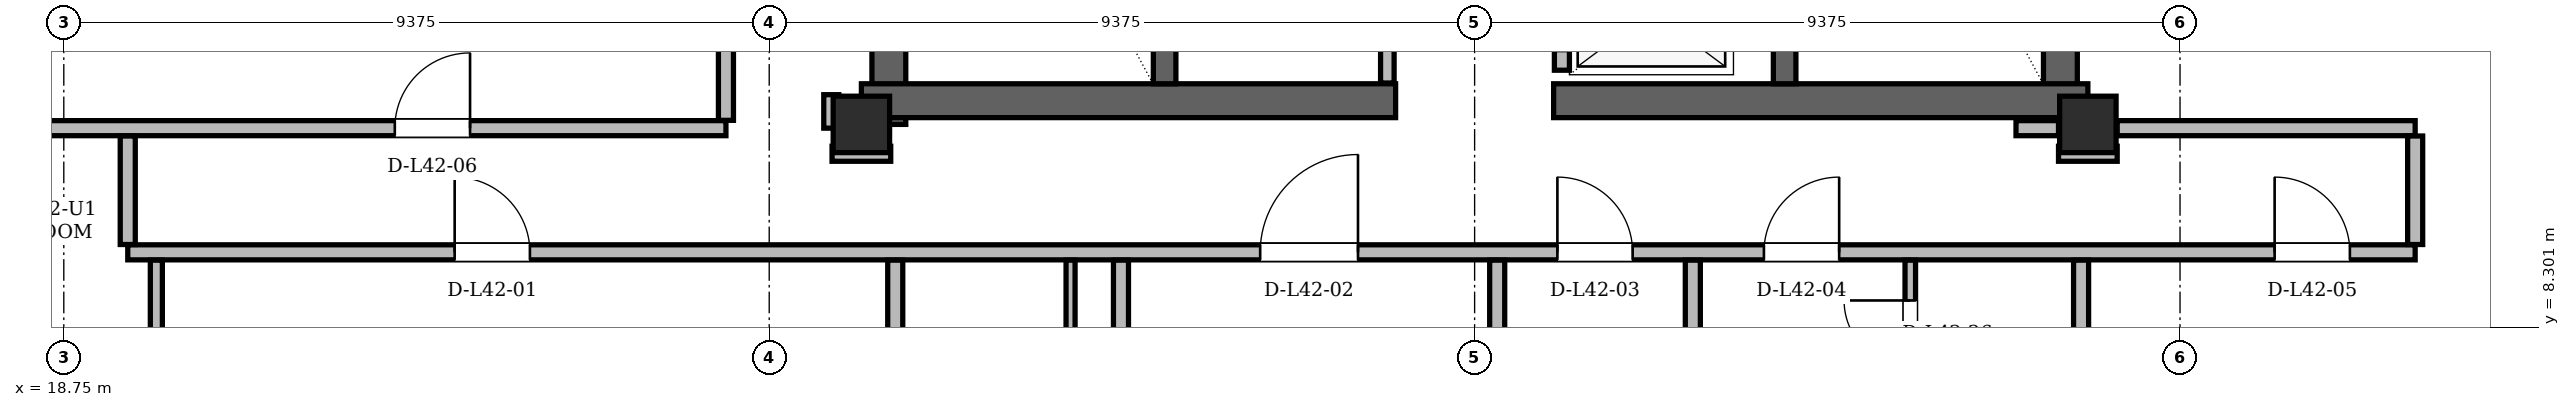
"""IFC4 building model, lengths in metres.
Left out: names, types, materials, properties, quantities, classifications, styles, units other than length and angle.
Written with IfcOpenShell. Run it as: python <this file> out.ifc"""

import sys

from ifc_helpers import new_model, si_unit, direction, frame, frame_2d, origin, origin_2d, place, context, subcontext, project, spatial, rectangle, hollow_rectangle, extrude, element, fill, save


model = new_model("IFC4")
c1 = context("Model", 3, precision=1e-05, world=origin(), true_north=direction((0.0, 1.0)))
c2 = subcontext(c1, "Body", "Model", "MODEL_VIEW")
j1 = project(units=[si_unit("LENGTHUNIT", "METRE"), si_unit("PLANEANGLEUNIT", "RADIAN")], contexts=[c1])
p1 = place(None, origin())
s1 = spatial("IfcSite", under=j1, at=p1, CompositionType="ELEMENT")
p2 = place(p1, origin())
s2 = spatial("IfcBuilding", under=s1, at=p2, CompositionType="ELEMENT")
p3 = place(p2, frame((0.0, 0.0, 160.2)))
s3 = spatial("IfcBuildingStorey", under=s2, at=p3, CompositionType="ELEMENT", Elevation=160.2)
for number, where, z_axis, x_axis in (
    (1, (29.35, 11.0, 0.0), (0.0, 0.0, 1.0), (1.0, 0.0, 0.0)),
    (2, (45.65, 11.0, 0.0), (0.0, 0.0, 1.0), (1.0, 0.0, 0.0)),
):
    element("IfcColumn", number, at=place(p3, frame(where, z_axis=z_axis, x_axis=x_axis)), inside=s3, PredefinedType="COLUMN", context=c2, shape_type="SweptSolid", body=[
        extrude(hollow_rectangle(XDim=0.75, YDim=0.75, WallThickness=0.06, at=origin_2d()), origin(), (0.0, 0.0, 1.0), 3.6),
    ])
for number, where, z_axis, x_axis in (
    (3, (29.715, 11.0, 0.0), (0.0, 0.0, 1.0), (0.0, 1.0, 0.0)),
    (4, (45.285, 11.0, 0.0), (0.0, 0.0, 1.0), (0.0, 1.0, 0.0)),
):
    element("IfcWall", number, at=place(p3, frame(where, z_axis=z_axis, x_axis=x_axis)), inside=s3, PredefinedType="SHEAR", context=c2, shape_type="SweptSolid", body=[
        extrude(rectangle(XDim=13.3, YDim=0.45, at=frame_2d((6.65, 0.0))), origin(), (0.0, 0.0, 1.0), 3.38),
    ])
for number, where, z_axis, x_axis in (
    (5, (29.35, 11.315, 0.0), (0.0, 0.0, 1.0), (1.0, 0.0, 0.0)),
    (6, (38.55, 11.315, 0.0), (0.0, 0.0, 1.0), (1.0, 0.0, 0.0)),
):
    element("IfcWall", number, at=place(p3, frame(where, z_axis=z_axis, x_axis=x_axis)), inside=s3, PredefinedType="SHEAR", context=c2, shape_type="SweptSolid", body=[
        extrude(rectangle(XDim=7.1, YDim=0.45, at=frame_2d((3.55, 0.0))), origin(), (0.0, 0.0, 1.0), 3.38),
    ])
for number, where, z_axis, x_axis in (
    (7, (33.38, 11.54, 0.0), (0.0, 0.0, 1.0), (0.0, 1.0, 0.0)),
    (8, (41.62, 11.54, 0.0), (0.0, 0.0, 1.0), (0.0, 1.0, 0.0)),
):
    element("IfcWall", number, at=place(p3, frame(where, z_axis=z_axis, x_axis=x_axis)), inside=s3, PredefinedType="SHEAR", context=c2, shape_type="SweptSolid", body=[
        extrude(rectangle(XDim=7.62, YDim=0.3, at=frame_2d((3.81, 0.0))), origin(), (0.0, 0.0, 1.0), 3.38),
    ])
p4 = place(p3, frame((15.147, 12.41, 0.0), z_axis=(0.0, 0.0, 1.0), x_axis=(0.500007864018, -0.866020863444, 0.0)))
e9 = element("IfcWall", 9, at=p4, inside=s3, PredefinedType="SOLIDWALL", context=c2, shape_type="SweptSolid", body=[
    extrude(rectangle(XDim=9.033, YDim=0.34, at=frame_2d((4.517, 0.0))), origin(), (0.0, 0.0, 1.0), 2.6),
])
p5 = place(p3, frame((36.34, 11.55, 0.0), z_axis=(0.0, 0.0, 1.0), x_axis=(0.0, 1.0, 0.0)))
e10 = element("IfcWall", 10, at=p5, inside=s3, PredefinedType="PARTITIONING", context=c2, shape_type="SweptSolid", body=[
    extrude(rectangle(XDim=5.55, YDim=0.18, at=frame_2d((2.775, 0.0))), origin(), (0.0, 0.0, 1.0), 3.38),
])
p6 = place(p5, frame((2.85, 0.0, 0.0)))
e11 = element("IfcOpeningElement", 11, at=p6, cuts=e10, PredefinedType="OPENING", context=c2, shape_type="SweptSolid", body=[
    extrude(rectangle(XDim=0.95, YDim=2.1, at=frame_2d((0.475, 1.05))), frame((0.0, 0.09, 0.0), z_axis=(0.0, -1.0, 0.0), x_axis=(1.0, 0.0, 0.0)), (0.0, 0.0, 1.0), 0.18),
])
p7 = place(p3, frame((38.66, 11.72, 0.0), z_axis=(0.0, 0.0, 1.0), x_axis=(0.0, 1.0, 0.0)))
e12 = element("IfcWall", 12, at=p7, inside=s3, PredefinedType="PARTITIONING", context=c2, shape_type="SweptSolid", body=[
    extrude(rectangle(XDim=9.1, YDim=0.2, at=frame_2d((4.55, 0.0))), origin(), (0.0, 0.0, 1.0), 3.38),
])
p8 = place(p7, frame((0.255, 0.0, 0.0)))
e13 = element("IfcOpeningElement", 13, at=p8, cuts=e12, PredefinedType="OPENING", context=c2, shape_type="SweptSolid", body=[
    extrude(rectangle(XDim=1.05, YDim=2.15, at=frame_2d((0.525, 1.075))), frame((0.0, 0.1, 0.0), z_axis=(0.0, -1.0, 0.0), x_axis=(1.0, 0.0, 0.0)), (0.0, 0.0, 1.0), 0.2),
])
p9 = place(p7, frame((2.105, 0.0, 0.0)))
e14 = element("IfcOpeningElement", 14, at=p9, cuts=e12, PredefinedType="OPENING", context=c2, shape_type="SweptSolid", body=[
    extrude(rectangle(XDim=1.05, YDim=2.15, at=frame_2d((0.525, 1.075))), frame((0.0, 0.1, 0.0), z_axis=(0.0, -1.0, 0.0), x_axis=(1.0, 0.0, 0.0)), (0.0, 0.0, 1.0), 0.2),
])
p10 = place(p7, frame((3.955, 0.0, 0.0)))
e15 = element("IfcOpeningElement", 15, at=p10, cuts=e12, PredefinedType="OPENING", context=c2, shape_type="SweptSolid", body=[
    extrude(rectangle(XDim=1.05, YDim=2.15, at=frame_2d((0.525, 1.075))), frame((0.0, 0.1, 0.0), z_axis=(0.0, -1.0, 0.0), x_axis=(1.0, 0.0, 0.0)), (0.0, 0.0, 1.0), 0.2),
])
p11 = place(p3, frame((19.6, 9.3, 0.0), z_axis=(0.0, 0.0, 1.0), x_axis=(1.0, 0.0, 0.0)))
e16 = element("IfcWall", 16, at=p11, inside=s3, PredefinedType="PARTITIONING", context=c2, shape_type="SweptSolid", body=[
    extrude(rectangle(XDim=30.4, YDim=0.2, at=frame_2d((15.2, 0.0))), origin(), (0.0, 0.0, 1.0), 2.842),
])
p12 = place(p11, frame((4.345, 0.0, 0.0)))
e17 = element("IfcOpeningElement", 17, at=p12, cuts=e16, PredefinedType="OPENING", context=c2, shape_type="SweptSolid", body=[
    extrude(rectangle(XDim=1.0, YDim=2.18, at=frame_2d((0.5, 1.09))), frame((0.0, 0.1, 0.0), z_axis=(0.0, -1.0, 0.0), x_axis=(1.0, 0.0, 0.0)), (0.0, 0.0, 1.0), 0.2),
])
p13 = place(p11, frame((15.05, 0.0, 0.0)))
e18 = element("IfcOpeningElement", 18, at=p13, cuts=e16, PredefinedType="OPENING", context=c2, shape_type="SweptSolid", body=[
    extrude(rectangle(XDim=1.3, YDim=2.2, at=frame_2d((0.65, 1.1))), frame((0.0, 0.1, 0.0), z_axis=(0.0, -1.0, 0.0), x_axis=(1.0, 0.0, 0.0)), (0.0, 0.0, 1.0), 0.2),
])
p14 = place(p11, frame((19.0, 0.0, 0.0)))
e19 = element("IfcOpeningElement", 19, at=p14, cuts=e16, PredefinedType="OPENING", context=c2, shape_type="SweptSolid", body=[
    extrude(rectangle(XDim=1.0, YDim=2.18, at=frame_2d((0.5, 1.09))), frame((0.0, 0.1, 0.0), z_axis=(0.0, -1.0, 0.0), x_axis=(1.0, 0.0, 0.0)), (0.0, 0.0, 1.0), 0.2),
])
p15 = place(p11, frame((21.745, 0.0, 0.0)))
e20 = element("IfcOpeningElement", 20, at=p15, cuts=e16, PredefinedType="OPENING", context=c2, shape_type="SweptSolid", body=[
    extrude(rectangle(XDim=1.0, YDim=2.18, at=frame_2d((0.5, 1.09))), frame((0.0, 0.1, 0.0), z_axis=(0.0, -1.0, 0.0), x_axis=(1.0, 0.0, 0.0)), (0.0, 0.0, 1.0), 0.2),
])
p16 = place(p11, frame((28.532, 0.0, 0.0)))
e21 = element("IfcOpeningElement", 21, at=p16, cuts=e16, PredefinedType="OPENING", context=c2, shape_type="SweptSolid", body=[
    extrude(rectangle(XDim=1.0, YDim=2.18, at=frame_2d((0.5, 1.09))), frame((0.0, 0.1, 0.0), z_axis=(0.0, -1.0, 0.0), x_axis=(1.0, 0.0, 0.0)), (0.0, 0.0, 1.0), 0.2),
])
for number, where, z_axis, x_axis in (
    (22, (28.96, 10.61, 0.0), (0.0, 0.0, 1.0), (1.0, 0.0, 0.0)),
    (23, (45.26, 10.61, 0.0), (0.0, 0.0, 1.0), (1.0, 0.0, 0.0)),
):
    element("IfcWall", number, at=place(p3, frame(where, z_axis=z_axis, x_axis=x_axis)), inside=s3, PredefinedType="PARTITIONING", context=c2, shape_type="SweptSolid", body=[
        extrude(rectangle(XDim=0.78, YDim=0.2, at=frame_2d((0.39, 0.0))), origin(), (0.0, 0.0, 1.0), 2.42),
    ])
p17 = place(p3, frame((16.191, 10.95, 0.0), z_axis=(0.0, 0.0, 1.0), x_axis=(1.0, 0.0, 0.0)))
e24 = element("IfcWall", 24, at=p17, inside=s3, PredefinedType="PARTITIONING", context=c2, shape_type="SweptSolid", body=[
    extrude(rectangle(XDim=11.359, YDim=0.2, at=frame_2d((5.68, 0.0))), origin(), (0.0, 0.0, 1.0), 3.38),
])
p18 = place(p17, frame((6.958, 0.0, 0.0)))
e25 = element("IfcOpeningElement", 25, at=p18, cuts=e24, PredefinedType="OPENING", context=c2, shape_type="SweptSolid", body=[
    extrude(rectangle(XDim=1.0, YDim=2.18, at=frame_2d((0.5, 1.09))), frame((0.0, 0.1, 0.0), z_axis=(0.0, -1.0, 0.0), x_axis=(1.0, 0.0, 0.0)), (0.0, 0.0, 1.0), 0.2),
])
p19 = place(p3, frame((44.695, 10.95, 0.0), z_axis=(0.0, 0.0, 1.0), x_axis=(1.0, 0.0, 0.0)))
e26 = element("IfcWall", 26, at=p19, inside=s3, PredefinedType="PARTITIONING", context=c2, shape_type="SweptSolid", body=[
    extrude(rectangle(XDim=0.565, YDim=0.2, at=frame_2d((0.282, 0.0))), origin(), (0.0, 0.0, 1.0), 2.42),
])
p20 = place(p3, frame((46.04, 10.95, 0.0), z_axis=(0.0, 0.0, 1.0), x_axis=(1.0, 0.0, 0.0)))
e27 = element("IfcWall", 27, at=p20, inside=s3, PredefinedType="PARTITIONING", context=c2, shape_type="SweptSolid", body=[
    extrude(rectangle(XDim=3.96, YDim=0.2, at=frame_2d((1.98, 0.0))), origin(), (0.0, 0.0, 1.0), 2.842),
])
p21 = place(p3, frame((19.6, 9.404, 0.0), z_axis=(0.0, 0.0, 1.0), x_axis=(0.0, 1.0, 0.0)))
e28 = element("IfcWall", 28, at=p21, inside=s3, PredefinedType="PARTITIONING", context=c2, shape_type="SweptSolid", body=[
    extrude(rectangle(XDim=1.442, YDim=0.2, at=frame_2d((0.721, 0.0))), origin(), (0.0, 0.0, 1.0), 3.38),
])
p22 = place(p3, frame((19.98, 4.989, 0.0), z_axis=(0.0, 0.0, 1.0), x_axis=(0.0, 1.0, 0.0)))
e29 = element("IfcWall", 29, at=p22, inside=s3, PredefinedType="PARTITIONING", context=c2, shape_type="SweptSolid", body=[
    extrude(rectangle(XDim=4.207, YDim=0.16, at=frame_2d((2.104, 0.0))), origin(), (0.0, 0.0, 1.0), 3.38),
])
p23 = place(p22, frame((1.589, 0.0, 0.0)))
e30 = element("IfcOpeningElement", 30, at=p23, cuts=e29, PredefinedType="OPENING", context=c2, shape_type="SweptSolid", body=[
    extrude(rectangle(XDim=0.88, YDim=2.08, at=frame_2d((0.44, 1.04))), frame((0.0, 0.08, 0.0), z_axis=(0.0, -1.0, 0.0), x_axis=(1.0, 0.0, 0.0)), (0.0, 0.0, 1.0), 0.16),
])
p24 = place(p3, frame((27.55, 11.054, 0.0), z_axis=(0.0, 0.0, 1.0), x_axis=(0.0, 1.0, 0.0)))
e31 = element("IfcWall", 31, at=p24, inside=s3, PredefinedType="PARTITIONING", context=c2, shape_type="SweptSolid", body=[
    extrude(rectangle(XDim=5.692, YDim=0.2, at=frame_2d((2.846, 0.0))), origin(), (0.0, 0.0, 1.0), 2.842),
])
p25 = place(p3, frame((28.95, 10.95, 0.0), z_axis=(0.0, 0.0, 1.0), x_axis=(0.0, 1.0, 0.0)))
e32 = element("IfcWall", 32, at=p25, inside=s3, PredefinedType="PARTITIONING", context=c2, shape_type="SweptSolid", body=[
    extrude(rectangle(XDim=0.445, YDim=0.2, at=frame_2d((0.223, 0.0))), origin(), (0.0, 0.0, 1.0), 2.842),
])
p26 = place(p3, frame((29.8, 4.761, 0.0), z_axis=(0.0, 0.0, 1.0), x_axis=(0.0, 1.0, 0.0)))
e33 = element("IfcWall", 33, at=p26, inside=s3, PredefinedType="PARTITIONING", context=c2, shape_type="SweptSolid", body=[
    extrude(rectangle(XDim=4.435, YDim=0.2, at=frame_2d((2.218, 0.0))), origin(), (0.0, 0.0, 1.0), 3.38),
])
p27 = place(p3, frame((32.13, 4.761, 0.0), z_axis=(0.0, 0.0, 1.0), x_axis=(0.0, 1.0, 0.0)))
e34 = element("IfcWall", 34, at=p27, inside=s3, PredefinedType="PARTITIONING", context=c2, shape_type="SweptSolid", body=[
    extrude(rectangle(XDim=4.435, YDim=0.12, at=frame_2d((2.218, 0.0))), origin(), (0.0, 0.0, 1.0), 2.966),
])
p28 = place(p27, frame((1.818, 0.0, 0.0)))
e35 = element("IfcOpeningElement", 35, at=p28, cuts=e34, PredefinedType="OPENING", context=c2, shape_type="SweptSolid", body=[
    extrude(rectangle(XDim=0.88, YDim=2.08, at=frame_2d((0.44, 1.04))), frame((0.0, 0.06, 0.0), z_axis=(0.0, -1.0, 0.0), x_axis=(1.0, 0.0, 0.0)), (0.0, 0.0, 1.0), 0.12),
])
p29 = place(p3, frame((32.8, 5.104, 0.0), z_axis=(0.0, 0.0, 1.0), x_axis=(0.0, 1.0, 0.0)))
e36 = element("IfcWall", 36, at=p29, inside=s3, PredefinedType="PARTITIONING", context=c2, shape_type="SweptSolid", body=[
    extrude(rectangle(XDim=4.092, YDim=0.2, at=frame_2d((2.046, 0.0))), origin(), (0.0, 0.0, 1.0), 2.966),
])
p30 = place(p3, frame((37.8, 5.104, 0.0), z_axis=(0.0, 0.0, 1.0), x_axis=(0.0, 1.0, 0.0)))
e37 = element("IfcWall", 37, at=p30, inside=s3, PredefinedType="PARTITIONING", context=c2, shape_type="SweptSolid", body=[
    extrude(rectangle(XDim=4.092, YDim=0.2, at=frame_2d((2.046, 0.0))), origin(), (0.0, 0.0, 1.0), 3.38),
])
p31 = place(p3, frame((40.4, 4.761, 0.0), z_axis=(0.0, 0.0, 1.0), x_axis=(0.0, 1.0, 0.0)))
e38 = element("IfcWall", 38, at=p31, inside=s3, PredefinedType="PARTITIONING", context=c2, shape_type="SweptSolid", body=[
    extrude(rectangle(XDim=4.435, YDim=0.2, at=frame_2d((2.218, 0.0))), origin(), (0.0, 0.0, 1.0), 3.38),
])
p32 = place(p3, frame((43.29, 4.761, 0.0), z_axis=(0.0, 0.0, 1.0), x_axis=(0.0, 1.0, 0.0)))
e39 = element("IfcWall", 39, at=p32, inside=s3, PredefinedType="PARTITIONING", context=c2, shape_type="SweptSolid", body=[
    extrude(rectangle(XDim=4.435, YDim=0.14, at=frame_2d((2.218, 0.0))), origin(), (0.0, 0.0, 1.0), 2.966),
])
p33 = place(p32, frame((0.673, 0.0, 0.0)))
e40 = element("IfcOpeningElement", 40, at=p33, cuts=e39, PredefinedType="OPENING", context=c2, shape_type="SweptSolid", body=[
    extrude(rectangle(XDim=0.95, YDim=2.1, at=frame_2d((0.475, 1.05))), frame((0.0, 0.07, 0.0), z_axis=(0.0, -1.0, 0.0), x_axis=(1.0, 0.0, 0.0)), (0.0, 0.0, 1.0), 0.14),
])
p34 = place(p32, frame((3.02, 0.0, 0.0)))
e41 = element("IfcOpeningElement", 41, at=p34, cuts=e39, PredefinedType="OPENING", context=c2, shape_type="SweptSolid", body=[
    extrude(rectangle(XDim=0.88, YDim=2.08, at=frame_2d((0.44, 1.04))), frame((0.0, 0.07, 0.0), z_axis=(0.0, -1.0, 0.0), x_axis=(1.0, 0.0, 0.0)), (0.0, 0.0, 1.0), 0.14),
])
p35 = place(p3, frame((45.56, 4.761, 0.0), z_axis=(0.0, 0.0, 1.0), x_axis=(0.0, 1.0, 0.0)))
e42 = element("IfcWall", 42, at=p35, inside=s3, PredefinedType="PARTITIONING", context=c2, shape_type="SweptSolid", body=[
    extrude(rectangle(XDim=4.435, YDim=0.2, at=frame_2d((2.218, 0.0))), origin(), (0.0, 0.0, 1.0), 2.966),
])
p36 = place(p3, frame((50.0, 9.404, 0.0), z_axis=(0.0, 0.0, 1.0), x_axis=(0.0, 1.0, 0.0)))
e43 = element("IfcWall", 43, at=p36, inside=s3, PredefinedType="PARTITIONING", context=c2, shape_type="SweptSolid", body=[
    extrude(rectangle(XDim=1.442, YDim=0.2, at=frame_2d((0.721, 0.0))), origin(), (0.0, 0.0, 1.0), 3.38),
])
p37 = place(p12, origin())
e44 = element("IfcDoor", 44, at=p37, inside=s3, OperationType="SINGLE_SWING_LEFT", PredefinedType="DOOR", context=c2, shape_type="SweptSolid", body=[
    extrude(rectangle(XDim=1.0, YDim=2.18, at=frame_2d((0.5, 1.09))), frame((0.0, 0.025, 0.0), z_axis=(0.0, -1.0, 0.0), x_axis=(1.0, 0.0, 0.0)), (0.0, 0.0, 1.0), 0.05),
])
fill(e17, e44)
p38 = place(p13, origin())
e45 = element("IfcDoor", 45, at=p38, inside=s3, OperationType="SINGLE_SWING_RIGHT", PredefinedType="DOOR", context=c2, shape_type="SweptSolid", body=[
    extrude(rectangle(XDim=1.3, YDim=2.2, at=frame_2d((0.65, 1.1))), frame((0.0, 0.025, 0.0), z_axis=(0.0, -1.0, 0.0), x_axis=(1.0, 0.0, 0.0)), (0.0, 0.0, 1.0), 0.05),
])
fill(e18, e45)
p39 = place(p14, origin())
e46 = element("IfcDoor", 46, at=p39, inside=s3, OperationType="SINGLE_SWING_LEFT", PredefinedType="DOOR", context=c2, shape_type="SweptSolid", body=[
    extrude(rectangle(XDim=1.0, YDim=2.18, at=frame_2d((0.5, 1.09))), frame((0.0, 0.025, 0.0), z_axis=(0.0, -1.0, 0.0), x_axis=(1.0, 0.0, 0.0)), (0.0, 0.0, 1.0), 0.05),
])
fill(e19, e46)
p40 = place(p15, origin())
e47 = element("IfcDoor", 47, at=p40, inside=s3, OperationType="SINGLE_SWING_RIGHT", PredefinedType="DOOR", context=c2, shape_type="SweptSolid", body=[
    extrude(rectangle(XDim=1.0, YDim=2.18, at=frame_2d((0.5, 1.09))), frame((0.0, 0.025, 0.0), z_axis=(0.0, -1.0, 0.0), x_axis=(1.0, 0.0, 0.0)), (0.0, 0.0, 1.0), 0.05),
])
fill(e20, e47)
p41 = place(p16, origin())
e48 = element("IfcDoor", 48, at=p41, inside=s3, OperationType="SINGLE_SWING_LEFT", PredefinedType="DOOR", context=c2, shape_type="SweptSolid", body=[
    extrude(rectangle(XDim=1.0, YDim=2.18, at=frame_2d((0.5, 1.09))), frame((0.0, 0.025, 0.0), z_axis=(0.0, -1.0, 0.0), x_axis=(1.0, 0.0, 0.0)), (0.0, 0.0, 1.0), 0.05),
])
fill(e21, e48)
p42 = place(p18, origin())
e49 = element("IfcDoor", 49, at=p42, inside=s3, OperationType="SINGLE_SWING_RIGHT", PredefinedType="DOOR", context=c2, shape_type="SweptSolid", body=[
    extrude(rectangle(XDim=1.0, YDim=2.18, at=frame_2d((0.5, 1.09))), frame((0.0, 0.025, 0.0), z_axis=(0.0, -1.0, 0.0), x_axis=(1.0, 0.0, 0.0)), (0.0, 0.0, 1.0), 0.05),
])
fill(e25, e49)
p43 = place(p34, origin())
e50 = element("IfcDoor", 50, at=p43, inside=s3, OperationType="SINGLE_SWING_RIGHT", PredefinedType="DOOR", context=c2, shape_type="SweptSolid", body=[
    extrude(rectangle(XDim=0.88, YDim=2.08, at=frame_2d((0.44, 1.04))), frame((0.0, 0.025, 0.0), z_axis=(0.0, -1.0, 0.0), x_axis=(1.0, 0.0, 0.0)), (0.0, 0.0, 1.0), 0.05),
])
fill(e41, e50)
save(model, sys.argv[1])
